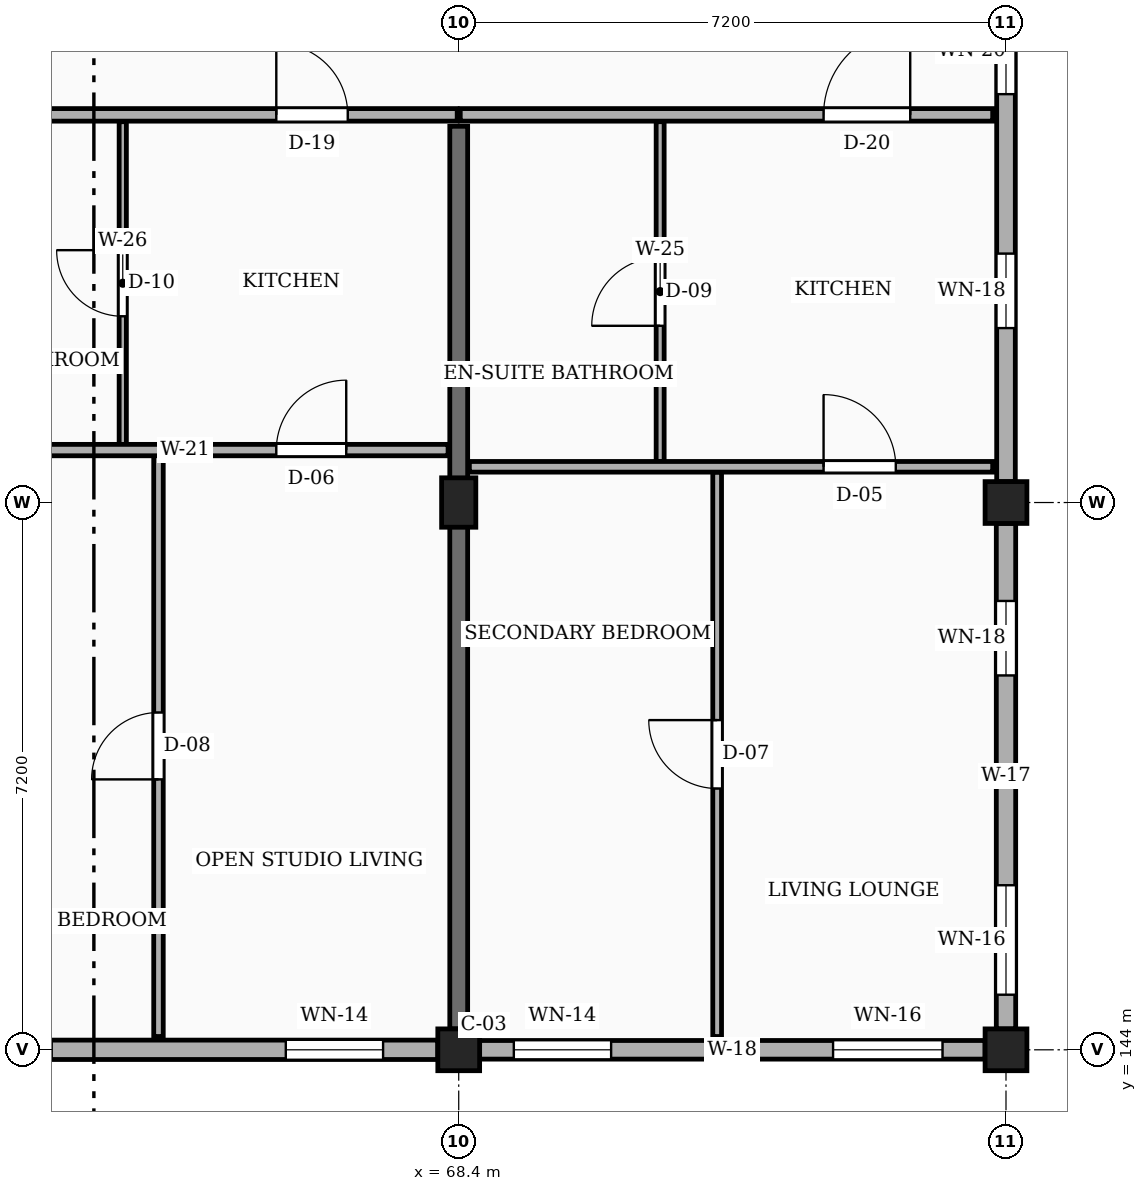
"""IFC4 building model, lengths in metres.
Left out: names, types, materials, properties, quantities, classifications, styles, units other than length and angle.
Written with IfcOpenShell. Run it as: python <this file> out.ifc"""

import sys

from ifc_helpers import new_model, si_unit, direction, frame, frame_2d, origin, origin_2d, place, context, subcontext, project, spatial, rectangle, extrude, element, fill, save


model = new_model("IFC4")
c1 = context("Model", 3, precision=1e-05, world=origin(), true_north=direction((0.0, 1.0)))
c2 = subcontext(c1, "Body", "Model", "MODEL_VIEW")
j1 = project(units=[si_unit("LENGTHUNIT", "METRE"), si_unit("PLANEANGLEUNIT", "RADIAN")], contexts=[c1])
p1 = place(None, origin())
s1 = spatial("IfcSite", under=j1, at=p1, CompositionType="ELEMENT")
p2 = place(p1, origin())
s2 = spatial("IfcBuilding", under=s1, at=p2, CompositionType="ELEMENT")
p3 = place(p2, frame((0.0, 0.0, 17.1)))
s3 = spatial("IfcBuildingStorey", under=s2, at=p3, CompositionType="ELEMENT", Elevation=17.1)
p4 = place(p3, frame((68.4, 144.0, 0.0), z_axis=(0.0, 0.0, 1.0), x_axis=(1.0, 0.0, 0.0)))
e1 = element("IfcColumn", 1, at=p4, inside=s3, PredefinedType="COLUMN", context=c2, shape_type="SweptSolid", body=[
    extrude(rectangle(XDim=0.55, YDim=0.55, at=origin_2d()), origin(), (0.0, 0.0, 1.0), 3.15),
])
p5 = place(p3, frame((68.4, 151.2, 0.0), z_axis=(0.0, 0.0, 1.0), x_axis=(1.0, 0.0, 0.0)))
e2 = element("IfcColumn", 2, at=p5, inside=s3, PredefinedType="COLUMN", context=c2, shape_type="SweptSolid", body=[
    extrude(rectangle(XDim=0.45, YDim=0.65, at=origin_2d()), origin(), (0.0, 0.0, 1.0), 3.15),
])
for number, where, z_axis, x_axis in (
    (3, (75.6, 144.0, 0.0), (0.0, 0.0, 1.0), (1.0, 0.0, 0.0)),
    (4, (75.6, 151.2, 0.0), (0.0, 0.0, 1.0), (1.0, 0.0, 0.0)),
):
    element("IfcColumn", number, at=place(p3, frame(where, z_axis=z_axis, x_axis=x_axis)), inside=s3, PredefinedType="COLUMN", context=c2, shape_type="SweptSolid", body=[
        extrude(rectangle(XDim=0.55, YDim=0.55, at=origin_2d()), origin(), (0.0, 0.0, 1.0), 3.15),
    ])
p6 = place(p3, frame((68.4, 144.275, 0.0), z_axis=(0.0, 0.0, 1.0), x_axis=(0.0, 1.0, 0.0)))
e5 = element("IfcWall", 5, at=p6, inside=s3, PredefinedType="SOLIDWALL", context=c2, shape_type="SweptSolid", body=[
    extrude(rectangle(XDim=11.875, YDim=0.235, at=frame_2d((5.938, 0.0))), origin(), (0.0, 0.0, 1.0), 2.185),
])
p7 = place(p3, frame((61.475, 144.0, 0.0), z_axis=(0.0, 0.0, 1.0), x_axis=(1.0, 0.0, 0.0)))
e6 = element("IfcWall", 6, at=p7, inside=s3, PredefinedType="SOLIDWALL", context=c2, shape_type="SweptSolid", body=[
    extrude(rectangle(XDim=6.65, YDim=0.255, at=frame_2d((3.325, 0.0))), origin(), (0.0, 0.0, 1.0), 2.455),
])
p8 = place(p7, frame((0.45, 0.0, 0.78)))
e7 = element("IfcOpeningElement", 7, at=p8, cuts=e6, PredefinedType="OPENING", context=c2, shape_type="SweptSolid", body=[
    extrude(rectangle(XDim=1.12, YDim=1.26, at=frame_2d((0.56, 0.63))), frame((0.0, 0.137, 0.0), z_axis=(0.0, -1.0, 0.0), x_axis=(1.0, 0.0, 0.0)), (0.0, 0.0, 1.0), 0.275),
])
p9 = place(p7, frame((4.65, 0.0, 0.78)))
e8 = element("IfcOpeningElement", 8, at=p9, cuts=e6, PredefinedType="OPENING", context=c2, shape_type="SweptSolid", body=[
    extrude(rectangle(XDim=1.28, YDim=1.26, at=frame_2d((0.64, 0.63))), frame((0.0, 0.137, 0.0), z_axis=(0.0, -1.0, 0.0), x_axis=(1.0, 0.0, 0.0)), (0.0, 0.0, 1.0), 0.275),
])
p10 = place(p3, frame((68.675, 144.0, 0.0), z_axis=(0.0, 0.0, 1.0), x_axis=(1.0, 0.0, 0.0)))
e9 = element("IfcWall", 9, at=p10, inside=s3, PredefinedType="SOLIDWALL", context=c2, shape_type="SweptSolid", body=[
    extrude(rectangle(XDim=6.65, YDim=0.245, at=frame_2d((3.325, 0.0))), origin(), (0.0, 0.0, 1.0), 2.455),
])
p11 = place(p10, frame((0.45, 0.0, 0.78)))
e10 = element("IfcOpeningElement", 10, at=p11, cuts=e9, PredefinedType="OPENING", context=c2, shape_type="SweptSolid", body=[
    extrude(rectangle(XDim=1.28, YDim=1.26, at=frame_2d((0.64, 0.63))), frame((0.0, 0.133, 0.0), z_axis=(0.0, -1.0, 0.0), x_axis=(1.0, 0.0, 0.0)), (0.0, 0.0, 1.0), 0.265),
])
p12 = place(p10, frame((4.65, 0.0, 0.78)))
e11 = element("IfcOpeningElement", 11, at=p12, cuts=e9, PredefinedType="OPENING", context=c2, shape_type="SweptSolid", body=[
    extrude(rectangle(XDim=1.44, YDim=1.26, at=frame_2d((0.72, 0.63))), frame((0.0, 0.133, 0.0), z_axis=(0.0, -1.0, 0.0), x_axis=(1.0, 0.0, 0.0)), (0.0, 0.0, 1.0), 0.265),
])
p13 = place(p3, frame((75.6, 144.275, 0.0), z_axis=(0.0, 0.0, 1.0), x_axis=(0.0, 1.0, 0.0)))
e12 = element("IfcWall", 12, at=p13, inside=s3, PredefinedType="SOLIDWALL", context=c2, shape_type="SweptSolid", body=[
    extrude(rectangle(XDim=6.65, YDim=0.255, at=frame_2d((3.325, 0.0))), origin(), (0.0, 0.0, 1.0), 2.455),
])
p14 = place(p13, frame((0.45, 0.0, 0.78)))
e13 = element("IfcOpeningElement", 13, at=p14, cuts=e12, PredefinedType="OPENING", context=c2, shape_type="SweptSolid", body=[
    extrude(rectangle(XDim=1.44, YDim=1.26, at=frame_2d((0.72, 0.63))), frame((0.0, 0.137, 0.0), z_axis=(0.0, -1.0, 0.0), x_axis=(1.0, 0.0, 0.0)), (0.0, 0.0, 1.0), 0.275),
])
p15 = place(p13, frame((4.65, 0.0, 0.78)))
e14 = element("IfcOpeningElement", 14, at=p15, cuts=e12, PredefinedType="OPENING", context=c2, shape_type="SweptSolid", body=[
    extrude(rectangle(XDim=0.98, YDim=1.36, at=frame_2d((0.49, 0.68))), frame((0.0, 0.137, 0.0), z_axis=(0.0, -1.0, 0.0), x_axis=(1.0, 0.0, 0.0)), (0.0, 0.0, 1.0), 0.275),
])
p16 = place(p3, frame((75.6, 151.475, 0.0), z_axis=(0.0, 0.0, 1.0), x_axis=(0.0, 1.0, 0.0)))
e15 = element("IfcWall", 15, at=p16, inside=s3, PredefinedType="SOLIDWALL", context=c2, shape_type="SweptSolid", body=[
    extrude(rectangle(XDim=6.65, YDim=0.245, at=frame_2d((3.325, 0.0))), origin(), (0.0, 0.0, 1.0), 2.455),
])
p17 = place(p16, frame((2.02, 0.0, 0.78)))
e16 = element("IfcOpeningElement", 16, at=p17, cuts=e15, PredefinedType="OPENING", context=c2, shape_type="SweptSolid", body=[
    extrude(rectangle(XDim=0.98, YDim=1.36, at=frame_2d((0.49, 0.68))), frame((0.0, 0.133, 0.0), z_axis=(0.0, -1.0, 0.0), x_axis=(1.0, 0.0, 0.0)), (0.0, 0.0, 1.0), 0.265),
])
p18 = place(p16, frame((5.097, 0.0, 0.78)))
e17 = element("IfcOpeningElement", 17, at=p18, cuts=e15, PredefinedType="OPENING", context=c2, shape_type="SweptSolid", body=[
    extrude(rectangle(XDim=1.14, YDim=1.36, at=frame_2d((0.57, 0.68))), frame((0.0, 0.133, 0.0), z_axis=(0.0, -1.0, 0.0), x_axis=(1.0, 0.0, 0.0)), (0.0, 0.0, 1.0), 0.265),
])
p19 = place(p3, frame((61.22, 156.3, 0.0), z_axis=(0.0, 0.0, 1.0), x_axis=(1.0, 0.0, 0.0)))
e18 = element("IfcWall", 18, at=p19, inside=s3, PredefinedType="PARTITIONING", context=c2, shape_type="SweptSolid", body=[
    extrude(rectangle(XDim=7.16, YDim=0.165, at=frame_2d((3.58, 0.0))), origin(), (0.0, 0.0, 1.0), 2.32),
])
p20 = place(p19, frame((4.78, 0.0, 0.0)))
e19 = element("IfcOpeningElement", 19, at=p20, cuts=e18, PredefinedType="OPENING", context=c2, shape_type="SweptSolid", body=[
    extrude(rectangle(XDim=0.94, YDim=2.12, at=frame_2d((0.47, 1.06))), frame((0.0, 0.093, 0.0), z_axis=(0.0, -1.0, 0.0), x_axis=(1.0, 0.0, 0.0)), (0.0, 0.0, 1.0), 0.185),
])
p21 = place(p3, frame((68.42, 156.3, 0.0), z_axis=(0.0, 0.0, 1.0), x_axis=(1.0, 0.0, 0.0)))
e20 = element("IfcWall", 20, at=p21, inside=s3, PredefinedType="PARTITIONING", context=c2, shape_type="SweptSolid", body=[
    extrude(rectangle(XDim=7.005, YDim=0.165, at=frame_2d((3.502, 0.0))), origin(), (0.0, 0.0, 1.0), 2.32),
])
p22 = place(p21, frame((4.78, 0.0, 0.0)))
e21 = element("IfcOpeningElement", 21, at=p22, cuts=e20, PredefinedType="OPENING", context=c2, shape_type="SweptSolid", body=[
    extrude(rectangle(XDim=1.14, YDim=2.18, at=frame_2d((0.57, 1.09))), frame((0.0, 0.093, 0.0), z_axis=(0.0, -1.0, 0.0), x_axis=(1.0, 0.0, 0.0)), (0.0, 0.0, 1.0), 0.185),
])
p23 = place(p3, frame((64.45, 144.175, 0.0), z_axis=(0.0, 0.0, 1.0), x_axis=(0.0, 1.0, 0.0)))
e22 = element("IfcWall", 22, at=p23, inside=s3, PredefinedType="PARTITIONING", context=c2, shape_type="SweptSolid", body=[
    extrude(rectangle(XDim=7.645, YDim=0.125, at=frame_2d((3.823, 0.0))), origin(), (0.0, 0.0, 1.0), 2.32),
])
p24 = place(p23, frame((3.383, 0.0, 0.0)))
e23 = element("IfcOpeningElement", 23, at=p24, cuts=e22, PredefinedType="OPENING", context=c2, shape_type="SweptSolid", body=[
    extrude(rectangle(XDim=0.88, YDim=2.08, at=frame_2d((0.44, 1.04))), frame((0.0, 0.073, 0.0), z_axis=(0.0, -1.0, 0.0), x_axis=(1.0, 0.0, 0.0)), (0.0, 0.0, 1.0), 0.145),
])
p25 = place(p3, frame((63.98, 151.96, 0.0), z_axis=(0.0, 0.0, 1.0), x_axis=(0.0, 1.0, 0.0)))
e24 = element("IfcWall", 24, at=p25, inside=s3, PredefinedType="PARTITIONING", context=c2, shape_type="SweptSolid", body=[
    extrude(rectangle(XDim=4.25, YDim=0.095, at=frame_2d((2.125, 0.0))), origin(), (0.0, 0.0, 1.0), 2.32),
])
p26 = place(p25, frame((1.69, 0.0, 0.0)))
e25 = element("IfcOpeningElement", 25, at=p26, cuts=e24, PredefinedType="OPENING", context=c2, shape_type="SweptSolid", body=[
    extrude(rectangle(XDim=0.87, YDim=2.05, at=frame_2d((0.435, 1.025))), frame((0.0, 0.058, 0.0), z_axis=(0.0, -1.0, 0.0), x_axis=(1.0, 0.0, 0.0)), (0.0, 0.0, 1.0), 0.115),
])
p27 = place(p3, frame((61.34, 151.89, 0.0), z_axis=(0.0, 0.0, 1.0), x_axis=(1.0, 0.0, 0.0)))
e26 = element("IfcWall", 26, at=p27, inside=s3, PredefinedType="PARTITIONING", context=c2, shape_type="SweptSolid", body=[
    extrude(rectangle(XDim=6.92, YDim=0.15, at=frame_2d((3.46, 0.0))), origin(), (0.0, 0.0, 1.0), 2.32),
])
p28 = place(p27, frame((4.66, 0.0, 0.0)))
e27 = element("IfcOpeningElement", 27, at=p28, cuts=e26, PredefinedType="OPENING", context=c2, shape_type="SweptSolid", body=[
    extrude(rectangle(XDim=0.92, YDim=2.1, at=frame_2d((0.46, 1.05))), frame((0.0, 0.085, 0.0), z_axis=(0.0, -1.0, 0.0), x_axis=(1.0, 0.0, 0.0)), (0.0, 0.0, 1.0), 0.17),
])
p29 = place(p3, frame((71.8, 144.175, 0.0), z_axis=(0.0, 0.0, 1.0), x_axis=(0.0, 1.0, 0.0)))
e28 = element("IfcWall", 28, at=p29, inside=s3, PredefinedType="PARTITIONING", context=c2, shape_type="SweptSolid", body=[
    extrude(rectangle(XDim=7.425, YDim=0.115, at=frame_2d((3.712, 0.0))), origin(), (0.0, 0.0, 1.0), 2.32),
])
p30 = place(p29, frame((3.262, 0.0, 0.0)))
e29 = element("IfcOpeningElement", 29, at=p30, cuts=e28, PredefinedType="OPENING", context=c2, shape_type="SweptSolid", body=[
    extrude(rectangle(XDim=0.9, YDim=2.1, at=frame_2d((0.45, 1.05))), frame((0.0, 0.067, 0.0), z_axis=(0.0, -1.0, 0.0), x_axis=(1.0, 0.0, 0.0)), (0.0, 0.0, 1.0), 0.135),
])
p31 = place(p3, frame((71.05, 151.74, 0.0), z_axis=(0.0, 0.0, 1.0), x_axis=(0.0, 1.0, 0.0)))
e30 = element("IfcWall", 30, at=p31, inside=s3, PredefinedType="PARTITIONING", context=c2, shape_type="SweptSolid", body=[
    extrude(rectangle(XDim=4.47, YDim=0.105, at=frame_2d((2.235, 0.0))), origin(), (0.0, 0.0, 1.0), 2.32),
])
p32 = place(p31, frame((1.785, 0.0, 0.0)))
e31 = element("IfcOpeningElement", 31, at=p32, cuts=e30, PredefinedType="OPENING", context=c2, shape_type="SweptSolid", body=[
    extrude(rectangle(XDim=0.9, YDim=2.05, at=frame_2d((0.45, 1.025))), frame((0.0, 0.062, 0.0), z_axis=(0.0, -1.0, 0.0), x_axis=(1.0, 0.0, 0.0)), (0.0, 0.0, 1.0), 0.125),
])
p33 = place(p3, frame((68.54, 151.67, 0.0), z_axis=(0.0, 0.0, 1.0), x_axis=(1.0, 0.0, 0.0)))
e32 = element("IfcWall", 32, at=p33, inside=s3, PredefinedType="PARTITIONING", context=c2, shape_type="SweptSolid", body=[
    extrude(rectangle(XDim=6.885, YDim=0.14, at=frame_2d((3.442, 0.0))), origin(), (0.0, 0.0, 1.0), 2.32),
])
p34 = place(p33, frame((4.66, 0.0, 0.0)))
e33 = element("IfcOpeningElement", 33, at=p34, cuts=e32, PredefinedType="OPENING", context=c2, shape_type="SweptSolid", body=[
    extrude(rectangle(XDim=0.95, YDim=2.1, at=frame_2d((0.475, 1.05))), frame((0.0, 0.08, 0.0), z_axis=(0.0, -1.0, 0.0), x_axis=(1.0, 0.0, 0.0)), (0.0, 0.0, 1.0), 0.16),
])
p35 = place(p9, origin())
e34 = element("IfcWindow", 34, at=p35, inside=s3, PartitioningType="SINGLE_PANEL", PredefinedType="WINDOW", context=c2, shape_type="SweptSolid", body=[
    extrude(rectangle(XDim=1.28, YDim=1.26, at=frame_2d((0.64, 0.63))), frame((0.0, 0.03, 0.0), z_axis=(0.0, -1.0, 0.0), x_axis=(1.0, 0.0, 0.0)), (0.0, 0.0, 1.0), 0.06),
])
fill(e8, e34)
p36 = place(p11, origin())
e35 = element("IfcWindow", 35, at=p36, inside=s3, PartitioningType="SINGLE_PANEL", PredefinedType="WINDOW", context=c2, shape_type="SweptSolid", body=[
    extrude(rectangle(XDim=1.28, YDim=1.26, at=frame_2d((0.64, 0.63))), frame((0.0, 0.03, 0.0), z_axis=(0.0, -1.0, 0.0), x_axis=(1.0, 0.0, 0.0)), (0.0, 0.0, 1.0), 0.06),
])
fill(e10, e35)
p37 = place(p12, origin())
e36 = element("IfcWindow", 36, at=p37, inside=s3, PartitioningType="SINGLE_PANEL", PredefinedType="WINDOW", context=c2, shape_type="SweptSolid", body=[
    extrude(rectangle(XDim=1.44, YDim=1.26, at=frame_2d((0.72, 0.63))), frame((0.0, 0.03, 0.0), z_axis=(0.0, -1.0, 0.0), x_axis=(1.0, 0.0, 0.0)), (0.0, 0.0, 1.0), 0.06),
])
fill(e11, e36)
p38 = place(p14, origin())
e37 = element("IfcWindow", 37, at=p38, inside=s3, PartitioningType="SINGLE_PANEL", PredefinedType="WINDOW", context=c2, shape_type="SweptSolid", body=[
    extrude(rectangle(XDim=1.44, YDim=1.26, at=frame_2d((0.72, 0.63))), frame((0.0, 0.03, 0.0), z_axis=(0.0, -1.0, 0.0), x_axis=(1.0, 0.0, 0.0)), (0.0, 0.0, 1.0), 0.06),
])
fill(e13, e37)
p39 = place(p15, origin())
e38 = element("IfcWindow", 38, at=p39, inside=s3, PartitioningType="SINGLE_PANEL", PredefinedType="WINDOW", context=c2, shape_type="SweptSolid", body=[
    extrude(rectangle(XDim=0.98, YDim=1.36, at=frame_2d((0.49, 0.68))), frame((0.0, 0.03, 0.0), z_axis=(0.0, -1.0, 0.0), x_axis=(1.0, 0.0, 0.0)), (0.0, 0.0, 1.0), 0.06),
])
fill(e14, e38)
p40 = place(p17, origin())
e39 = element("IfcWindow", 39, at=p40, inside=s3, PartitioningType="SINGLE_PANEL", PredefinedType="WINDOW", context=c2, shape_type="SweptSolid", body=[
    extrude(rectangle(XDim=0.98, YDim=1.36, at=frame_2d((0.49, 0.68))), frame((0.0, 0.03, 0.0), z_axis=(0.0, -1.0, 0.0), x_axis=(1.0, 0.0, 0.0)), (0.0, 0.0, 1.0), 0.06),
])
fill(e16, e39)
p41 = place(p18, origin())
e40 = element("IfcWindow", 40, at=p41, inside=s3, PartitioningType="SINGLE_PANEL", PredefinedType="WINDOW", context=c2, shape_type="SweptSolid", body=[
    extrude(rectangle(XDim=1.14, YDim=1.36, at=frame_2d((0.57, 0.68))), frame((0.0, 0.03, 0.0), z_axis=(0.0, -1.0, 0.0), x_axis=(1.0, 0.0, 0.0)), (0.0, 0.0, 1.0), 0.06),
])
fill(e17, e40)
p42 = place(p20, origin())
e41 = element("IfcDoor", 41, at=p42, inside=s3, OperationType="SINGLE_SWING_LEFT", PredefinedType="DOOR", context=c2, shape_type="SweptSolid", body=[
    extrude(rectangle(XDim=0.94, YDim=2.12, at=frame_2d((0.47, 1.06))), frame((0.0, 0.025, 0.0), z_axis=(0.0, -1.0, 0.0), x_axis=(1.0, 0.0, 0.0)), (0.0, 0.0, 1.0), 0.05),
])
fill(e19, e41)
p43 = place(p22, origin())
e42 = element("IfcDoor", 42, at=p43, inside=s3, OperationType="SINGLE_SWING_RIGHT", PredefinedType="DOOR", context=c2, shape_type="SweptSolid", body=[
    extrude(rectangle(XDim=1.14, YDim=2.18, at=frame_2d((0.57, 1.09))), frame((0.0, 0.025, 0.0), z_axis=(0.0, -1.0, 0.0), x_axis=(1.0, 0.0, 0.0)), (0.0, 0.0, 1.0), 0.05),
])
fill(e21, e42)
p44 = place(p24, origin())
e43 = element("IfcDoor", 43, at=p44, inside=s3, OperationType="SINGLE_SWING_LEFT", PredefinedType="DOOR", context=c2, shape_type="SweptSolid", body=[
    extrude(rectangle(XDim=0.88, YDim=2.08, at=frame_2d((0.44, 1.04))), frame((0.0, 0.025, 0.0), z_axis=(0.0, -1.0, 0.0), x_axis=(1.0, 0.0, 0.0)), (0.0, 0.0, 1.0), 0.05),
])
fill(e23, e43)
p45 = place(p26, origin())
e44 = element("IfcDoor", 44, at=p45, inside=s3, OperationType="SINGLE_SWING_RIGHT", PredefinedType="DOOR", context=c2, shape_type="SweptSolid", body=[
    extrude(rectangle(XDim=0.87, YDim=2.05, at=frame_2d((0.435, 1.025))), frame((0.0, 0.025, 0.0), z_axis=(0.0, -1.0, 0.0), x_axis=(1.0, 0.0, 0.0)), (0.0, 0.0, 1.0), 0.05),
])
fill(e25, e44)
p46 = place(p28, origin())
e45 = element("IfcDoor", 45, at=p46, inside=s3, OperationType="SINGLE_SWING_RIGHT", PredefinedType="DOOR", context=c2, shape_type="SweptSolid", body=[
    extrude(rectangle(XDim=0.92, YDim=2.1, at=frame_2d((0.46, 1.05))), frame((0.0, 0.025, 0.0), z_axis=(0.0, -1.0, 0.0), x_axis=(1.0, 0.0, 0.0)), (0.0, 0.0, 1.0), 0.05),
])
fill(e27, e45)
p47 = place(p30, origin())
e46 = element("IfcDoor", 46, at=p47, inside=s3, OperationType="SINGLE_SWING_RIGHT", PredefinedType="DOOR", context=c2, shape_type="SweptSolid", body=[
    extrude(rectangle(XDim=0.9, YDim=2.1, at=frame_2d((0.45, 1.05))), frame((0.0, 0.025, 0.0), z_axis=(0.0, -1.0, 0.0), x_axis=(1.0, 0.0, 0.0)), (0.0, 0.0, 1.0), 0.05),
])
fill(e29, e46)
p48 = place(p32, origin())
e47 = element("IfcDoor", 47, at=p48, inside=s3, OperationType="SINGLE_SWING_LEFT", PredefinedType="DOOR", context=c2, shape_type="SweptSolid", body=[
    extrude(rectangle(XDim=0.9, YDim=2.05, at=frame_2d((0.45, 1.025))), frame((0.0, 0.025, 0.0), z_axis=(0.0, -1.0, 0.0), x_axis=(1.0, 0.0, 0.0)), (0.0, 0.0, 1.0), 0.05),
])
fill(e31, e47)
p49 = place(p34, origin())
e48 = element("IfcDoor", 48, at=p49, inside=s3, OperationType="SINGLE_SWING_LEFT", PredefinedType="DOOR", context=c2, shape_type="SweptSolid", body=[
    extrude(rectangle(XDim=0.95, YDim=2.1, at=frame_2d((0.475, 1.05))), frame((0.0, 0.025, 0.0), z_axis=(0.0, -1.0, 0.0), x_axis=(1.0, 0.0, 0.0)), (0.0, 0.0, 1.0), 0.05),
])
fill(e33, e48)
save(model, sys.argv[1])
